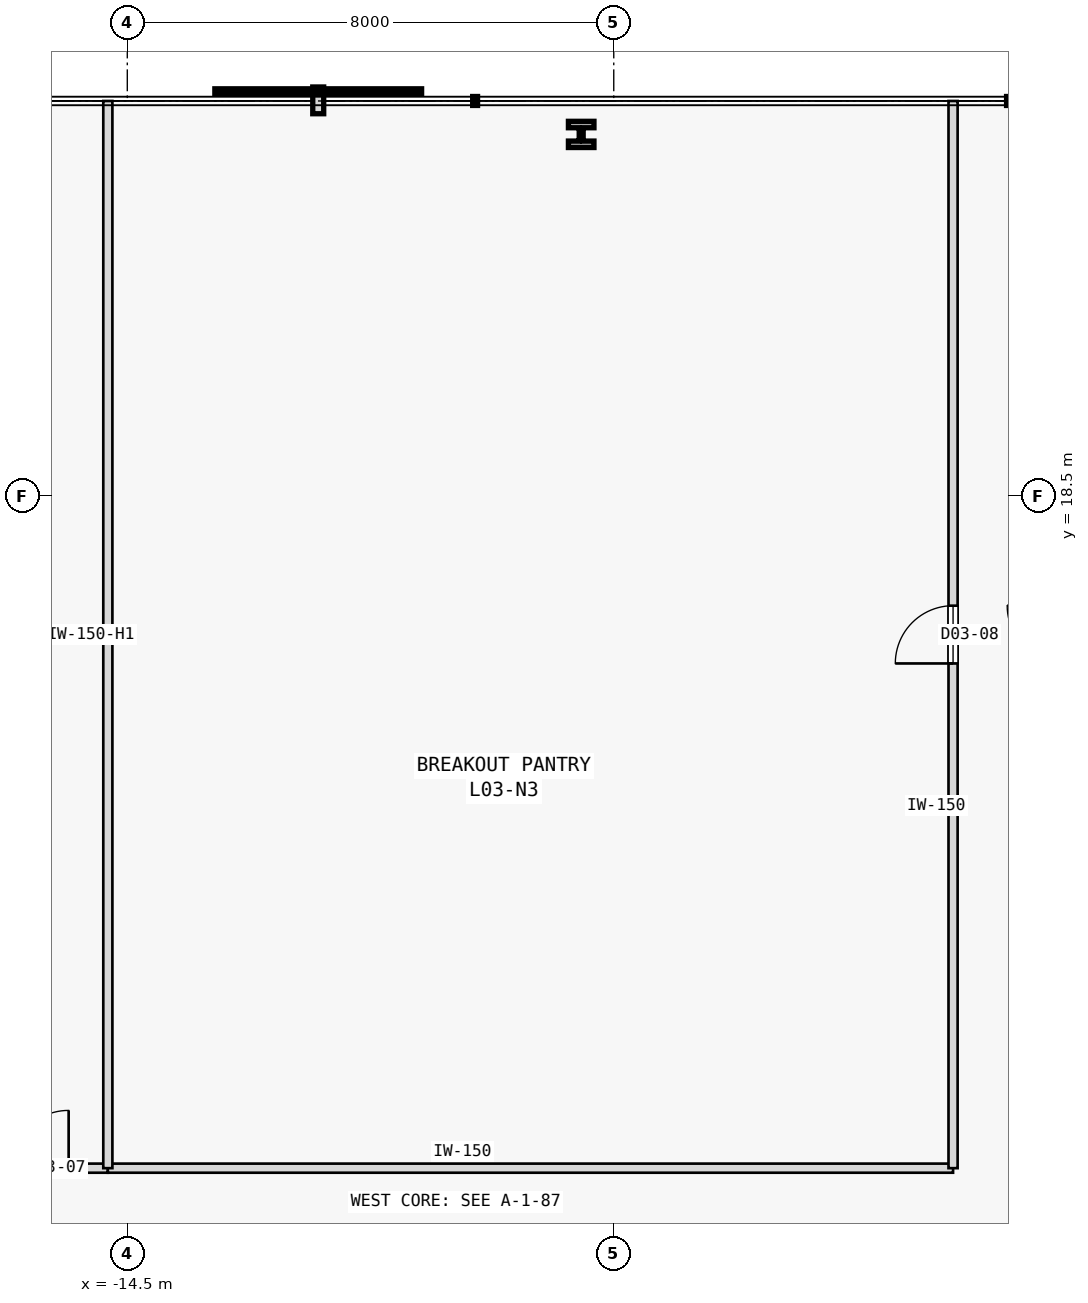
"""IFC4 building model, lengths in metres.
Left out: names, types, materials, properties, quantities, classifications, styles, units other than length and angle.
Written with IfcOpenShell. Run it as: python <this file> out.ifc"""

import sys

from ifc_helpers import new_model, si_unit, direction, frame, frame_2d, origin, origin_2d, place, context, subcontext, project, spatial, rectangle, i_section, extrude, element, fill, save


model = new_model("IFC4")
c1 = context("Model", 3, precision=1e-05, world=origin(), true_north=direction((0.0, 1.0)))
c2 = subcontext(c1, "Body", "Model", "MODEL_VIEW")
j1 = project(units=[si_unit("LENGTHUNIT", "METRE"), si_unit("PLANEANGLEUNIT", "RADIAN")], contexts=[c1])
p1 = place(None, origin())
s1 = spatial("IfcSite", under=j1, at=p1, CompositionType="ELEMENT")
p2 = place(p1, origin())
s2 = spatial("IfcBuilding", under=s1, at=p2, CompositionType="ELEMENT")
p3 = place(p2, frame((0.0, 0.0, 18.0)))
s3 = spatial("IfcBuildingStorey", under=s2, at=p3, CompositionType="ELEMENT", Elevation=18.0)
p4 = place(p3, frame((-7.036, 24.45, 0.0), z_axis=(0.0, 0.0, 1.0), x_axis=(1.0, 0.0, 0.0)))
e1 = element("IfcColumn", 1, at=p4, inside=s3, PredefinedType="COLUMN", context=c2, shape_type="SweptSolid", body=[
    extrude(i_section(OverallWidth=0.42, OverallDepth=0.431, WebThickness=0.065, FlangeThickness=0.106, FilletRadius=0.015, at=origin_2d()), origin(), (0.0, 0.0, 1.0), 3.8),
])
p5 = place(p3, frame((-17.059, 7.45, 0.0), z_axis=(0.0, 0.0, 1.0), x_axis=(1.0, 0.0, 0.0)))
e2 = element("IfcWall", 2, at=p5, inside=s3, PredefinedType="PARTITIONING", context=c2, shape_type="SweptSolid", body=[
    extrude(rectangle(XDim=2.239, YDim=0.15, at=frame_2d((1.12, 0.0))), origin(), (0.0, 0.0, 1.0), 3.575),
])
p6 = place(p5, frame((0.645, 0.0, 0.0)))
e3 = element("IfcOpeningElement", 3, at=p6, cuts=e2, PredefinedType="OPENING", context=c2, shape_type="SweptSolid", body=[
    extrude(rectangle(XDim=0.95, YDim=2.15, at=frame_2d((0.475, 1.075))), frame((0.0, 0.085, 0.0), z_axis=(0.0, -1.0, 0.0), x_axis=(1.0, 0.0, 0.0)), (0.0, 0.0, 1.0), 0.17),
])
p7 = place(p3, frame((-14.82, 7.45, 0.0), z_axis=(0.0, 0.0, 1.0), x_axis=(1.0, 0.0, 0.0)))
e4 = element("IfcWall", 4, at=p7, inside=s3, PredefinedType="PARTITIONING", context=c2, shape_type="SweptSolid", body=[
    extrude(rectangle(XDim=13.9, YDim=0.15, at=frame_2d((6.95, 0.0))), origin(), (0.0, 0.0, 1.0), 3.575),
])
p8 = place(p3, frame((-0.92, 7.45, 0.0), z_axis=(0.0, 0.0, 1.0), x_axis=(0.0, 1.0, 0.0)))
e5 = element("IfcWall", 5, at=p8, inside=s3, PredefinedType="PARTITIONING", context=c2, shape_type="SweptSolid", body=[
    extrude(rectangle(XDim=17.55, YDim=0.15, at=frame_2d((8.775, 0.0))), origin(), (0.0, 0.0, 1.0), 3.575),
])
p9 = place(p8, frame((8.3, 0.0, 0.0)))
e6 = element("IfcOpeningElement", 6, at=p9, cuts=e5, PredefinedType="OPENING", context=c2, shape_type="SweptSolid", body=[
    extrude(rectangle(XDim=0.95, YDim=2.15, at=frame_2d((0.475, 1.075))), frame((0.0, 0.085, 0.0), z_axis=(0.0, -1.0, 0.0), x_axis=(1.0, 0.0, 0.0)), (0.0, 0.0, 1.0), 0.17),
])
p10 = place(p3, frame((-14.82, 7.45, 0.0), z_axis=(0.0, 0.0, 1.0), x_axis=(0.0, 1.0, 0.0)))
e7 = element("IfcWall", 7, at=p10, inside=s3, PredefinedType="PARTITIONING", context=c2, shape_type="SweptSolid", body=[
    extrude(rectangle(XDim=17.55, YDim=0.15, at=frame_2d((8.775, 0.0))), origin(), (0.0, 0.0, 1.0), 3.125),
])
p11 = place(p6, origin())
e8 = element("IfcDoor", 8, at=p11, inside=s3, OperationType="SINGLE_SWING_RIGHT", PredefinedType="DOOR", context=c2, shape_type="SweptSolid", body=[
    extrude(rectangle(XDim=0.95, YDim=2.15, at=frame_2d((0.475, 1.075))), frame((0.0, 0.025, 0.0), z_axis=(0.0, -1.0, 0.0), x_axis=(1.0, 0.0, 0.0)), (0.0, 0.0, 1.0), 0.05),
])
fill(e3, e8)
p12 = place(p9, origin())
e9 = element("IfcDoor", 9, at=p12, inside=s3, OperationType="SINGLE_SWING_LEFT", PredefinedType="DOOR", context=c2, shape_type="SweptSolid", body=[
    extrude(rectangle(XDim=0.95, YDim=2.15, at=frame_2d((0.475, 1.075))), frame((0.0, 0.025, 0.0), z_axis=(0.0, -1.0, 0.0), x_axis=(1.0, 0.0, 0.0)), (0.0, 0.0, 1.0), 0.05),
])
fill(e6, e9)
save(model, sys.argv[1])
